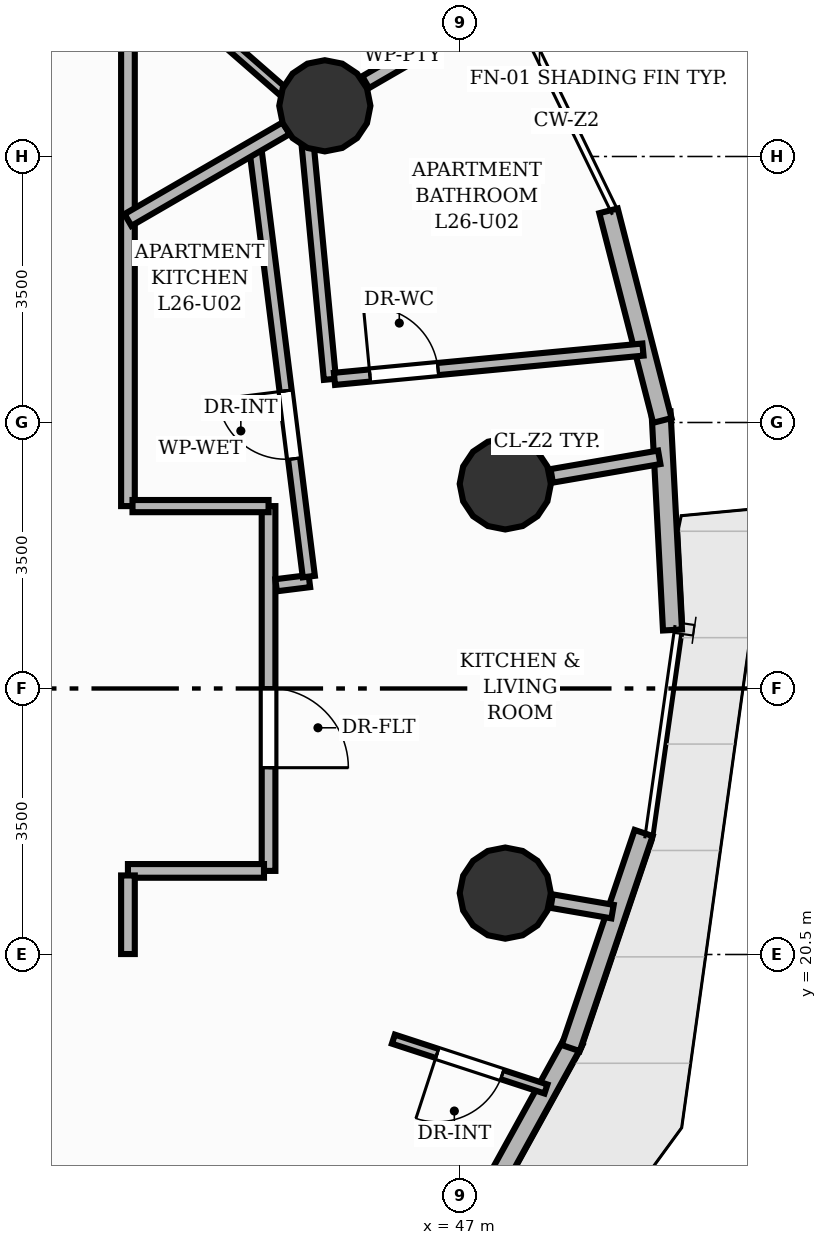
"""IFC4 building model, lengths in metres.
Left out: names, types, materials, properties, quantities, classifications, styles, units other than length and angle.
Written with IfcOpenShell. Run it as: python <this file> out.ifc"""

import sys

from ifc_helpers import new_model, si_unit, direction, frame, frame_2d, origin, origin_2d, place, context, subcontext, project, spatial, rectangle, circle, extrude, element, fill, save


model = new_model("IFC4")
c1 = context("Model", 3, precision=1e-05, world=origin(), true_north=direction((0.0, 1.0)))
c2 = subcontext(c1, "Body", "Model", "MODEL_VIEW")
j1 = project(units=[si_unit("LENGTHUNIT", "METRE"), si_unit("PLANEANGLEUNIT", "RADIAN")], contexts=[c1])
p1 = place(None, origin())
s1 = spatial("IfcSite", under=j1, at=p1, CompositionType="ELEMENT")
p2 = place(p1, origin())
s2 = spatial("IfcBuilding", under=s1, at=p2, CompositionType="ELEMENT")
p3 = place(p2, frame((0.0, 0.0, 90.08)))
s3 = spatial("IfcBuildingStorey", under=s2, at=p3, CompositionType="ELEMENT", Elevation=90.08)
for number, where, z_axis, x_axis in (
    (1, (47.594, 26.692, 0.0), (0.0, 0.0, 1.0), (1.0, 0.0, 0.0)),
    (2, (45.22, 31.667, 0.0), (0.0, 0.0, 1.0), (1.0, 0.0, 0.0)),
    (3, (47.594, 21.308, 0.0), (0.0, 0.0, 1.0), (1.0, 0.0, 0.0)),
):
    element("IfcColumn", number, at=place(p3, frame(where, z_axis=z_axis, x_axis=x_axis)), inside=s3, PredefinedType="COLUMN", context=c2, shape_type="SweptSolid", body=[
        extrude(circle(Radius=0.6, at=origin_2d()), origin(), (0.0, 0.0, 1.0), 3.2),
    ])
p4 = place(p3, frame((48.5, 19.371, 0.0), z_axis=(0.0, 0.0, 1.0), x_axis=(-0.482904421948, -0.875673066426, 0.0)))
e4 = element("IfcWall", 4, at=p4, inside=s3, PredefinedType="SOLIDWALL", context=c2, shape_type="SweptSolid", body=[
    extrude(rectangle(XDim=3.061, YDim=0.25, at=frame_2d((1.53, 0.0))), origin(), (0.0, 0.0, 1.0), 2.96),
])
p5 = place(p3, frame((49.415, 22.099, 0.0), z_axis=(0.0, 0.0, 1.0), x_axis=(-0.321149814784, -0.947028403198, 0.0)))
e5 = element("IfcWall", 5, at=p5, inside=s3, PredefinedType="SOLIDWALL", context=c2, shape_type="SweptSolid", body=[
    extrude(rectangle(XDim=2.988, YDim=0.25, at=frame_2d((1.494, 0.0))), origin(), (0.0, 0.0, 1.0), 2.96),
])
p6 = place(p3, frame((49.644, 27.64, 0.0), z_axis=(0.0, 0.0, 1.0), x_axis=(0.052411702269, -0.998625562193, 0.0)))
e6 = element("IfcWall", 6, at=p6, inside=s3, PredefinedType="SOLIDWALL", context=c2, shape_type="SweptSolid", body=[
    extrude(rectangle(XDim=2.874, YDim=0.25, at=frame_2d((1.437, 0.0))), origin(), (0.0, 0.0, 1.0), 2.96),
])
p7 = place(p3, frame((48.953, 30.285, 0.0), z_axis=(0.0, 0.0, 1.0), x_axis=(0.248825035787, -0.96854845081, 0.0)))
e7 = element("IfcWall", 7, at=p7, inside=s3, PredefinedType="SOLIDWALL", context=c2, shape_type="SweptSolid", body=[
    extrude(rectangle(XDim=2.847, YDim=0.25, at=frame_2d((1.424, 0.0))), origin(), (0.0, 0.0, 1.0), 2.96),
])
p8 = place(p3, frame((48.206, 26.798, 0.0), z_axis=(0.0, 0.0, 1.0), x_axis=(0.985402123708, 0.170242928172, 0.0)))
e8 = element("IfcWall", 8, at=p8, inside=s3, PredefinedType="PARTITIONING", context=c2, shape_type="SweptSolid", body=[
    extrude(rectangle(XDim=1.436, YDim=0.18, at=frame_2d((0.718, 0.0))), origin(), (0.0, 0.0, 1.0), 2.26),
])
p9 = place(p3, frame((45.757, 31.978, 0.0), z_axis=(0.0, 0.0, 1.0), x_axis=(0.865046065875, 0.501692439563, 0.0)))
e9 = element("IfcWall", 9, at=p9, inside=s3, PredefinedType="PARTITIONING", context=c2, shape_type="SweptSolid", body=[
    extrude(rectangle(XDim=1.994, YDim=0.18, at=frame_2d((0.997, 0.0))), origin(), (0.0, 0.0, 1.0), 2.26),
])
p10 = place(p3, frame((48.206, 21.202, 0.0), z_axis=(0.0, 0.0, 1.0), x_axis=(0.985418430365, -0.170148514822, 0.0)))
e10 = element("IfcWall", 10, at=p10, inside=s3, PredefinedType="PARTITIONING", context=c2, shape_type="SweptSolid", body=[
    extrude(rectangle(XDim=0.812, YDim=0.18, at=frame_2d((0.406, 0.0))), origin(), (0.0, 0.0, 1.0), 2.26),
])
p11 = place(p3, frame((44.48, 26.4, 0.0), z_axis=(0.0, 0.0, 1.0), x_axis=(0.0, -1.0, 0.0)))
e11 = element("IfcWall", 11, at=p11, inside=s3, PredefinedType="PARTITIONING", context=c2, shape_type="SweptSolid", body=[
    extrude(rectangle(XDim=4.8, YDim=0.18, at=frame_2d((2.4, 0.0))), origin(), (0.0, 0.0, 1.0), 2.955),
])
p12 = place(p11, frame((2.392, 0.0, 0.0)))
e12 = element("IfcOpeningElement", 12, at=p12, cuts=e11, PredefinedType="OPENING", context=c2, shape_type="SweptSolid", body=[
    extrude(rectangle(XDim=1.05, YDim=2.15, at=frame_2d((0.525, 1.075))), frame((0.0, 0.1, 0.0), z_axis=(0.0, -1.0, 0.0), x_axis=(1.0, 0.0, 0.0)), (0.0, 0.0, 1.0), 0.2),
])
p13 = place(p3, frame((44.42, 21.6, 0.0), z_axis=(0.0, 0.0, 1.0), x_axis=(-1.0, 0.0, 0.0)))
e13 = element("IfcWall", 13, at=p13, inside=s3, PredefinedType="PARTITIONING", context=c2, shape_type="SweptSolid", body=[
    extrude(rectangle(XDim=1.79, YDim=0.18, at=frame_2d((0.895, 0.0))), origin(), (0.0, 0.0, 1.0), 2.26),
])
p14 = place(p3, frame((42.63, 21.54, 0.0), z_axis=(0.0, 0.0, 1.0), x_axis=(0.0, -1.0, 0.0)))
e14 = element("IfcWall", 14, at=p14, inside=s3, PredefinedType="PARTITIONING", context=c2, shape_type="SweptSolid", body=[
    extrude(rectangle(XDim=1.034, YDim=0.18, at=frame_2d((0.517, 0.0))), origin(), (0.0, 0.0, 1.0), 2.955),
])
p15 = place(p3, frame((42.63, 32.63, 0.0), z_axis=(0.0, 0.0, 1.0), x_axis=(0.0, -1.0, 0.0)))
e15 = element("IfcWall", 15, at=p15, inside=s3, PredefinedType="PARTITIONING", context=c2, shape_type="SweptSolid", body=[
    extrude(rectangle(XDim=6.23, YDim=0.18, at=frame_2d((3.115, 0.0))), origin(), (0.0, 0.0, 1.0), 2.955),
])
p16 = place(p3, frame((42.69, 26.4, 0.0), z_axis=(0.0, 0.0, 1.0), x_axis=(1.0, 0.0, 0.0)))
e16 = element("IfcWall", 16, at=p16, inside=s3, PredefinedType="PLUMBINGWALL", context=c2, shape_type="SweptSolid", body=[
    extrude(rectangle(XDim=1.79, YDim=0.16, at=frame_2d((0.895, 0.0))), origin(), (0.0, 0.0, 1.0), 2.26),
])
p17 = place(p3, frame((44.997, 31.13, 0.0), z_axis=(0.0, 0.0, 1.0), x_axis=(0.094558062352, -0.995519348302, 0.0)))
e17 = element("IfcWall", 17, at=p17, inside=s3, PredefinedType="PLUMBINGWALL", context=c2, shape_type="SweptSolid", body=[
    extrude(rectangle(XDim=3.075, YDim=0.16, at=frame_2d((1.538, 0.0))), origin(), (0.0, 0.0, 1.0), 2.955),
])
p18 = place(p3, frame((45.347, 28.074, 0.0), z_axis=(0.0, 0.0, 1.0), x_axis=(0.995525564748, 0.09449259195, 0.0)))
e18 = element("IfcWall", 18, at=p18, inside=s3, PredefinedType="PLUMBINGWALL", context=c2, shape_type="SweptSolid", body=[
    extrude(rectangle(XDim=4.077, YDim=0.16, at=frame_2d((2.039, 0.0))), origin(), (0.0, 0.0, 1.0), 2.641),
])
p19 = place(p18, frame((0.469, 0.0, 0.0)))
e19 = element("IfcOpeningElement", 19, at=p19, cuts=e18, PredefinedType="OPENING", context=c2, shape_type="SweptSolid", body=[
    extrude(rectangle(XDim=0.9, YDim=2.1, at=frame_2d((0.45, 1.05))), frame((0.0, 0.09, 0.0), z_axis=(0.0, -1.0, 0.0), x_axis=(1.0, 0.0, 0.0)), (0.0, 0.0, 1.0), 0.18),
])
p20 = place(p3, frame((48.13, 18.73, 0.0), z_axis=(0.0, 0.0, 1.0), x_axis=(-0.950573429935, 0.310499845896, 0.0)))
e20 = element("IfcWall", 20, at=p20, inside=s3, PredefinedType="PARTITIONING", context=c2, shape_type="SweptSolid", body=[
    extrude(rectangle(XDim=2.112, YDim=0.125, at=frame_2d((1.056, 0.0))), origin(), (0.0, 0.0, 1.0), 2.955),
])
p21 = place(p20, frame((0.606, 0.0, 0.0)))
e21 = element("IfcOpeningElement", 21, at=p21, cuts=e20, PredefinedType="OPENING", context=c2, shape_type="SweptSolid", body=[
    extrude(rectangle(XDim=0.9, YDim=2.1, at=frame_2d((0.45, 1.05))), frame((0.0, 0.073, 0.0), z_axis=(0.0, -1.0, 0.0), x_axis=(1.0, 0.0, 0.0)), (0.0, 0.0, 1.0), 0.145),
])
p22 = place(p3, frame((44.579, 25.358, 0.0), z_axis=(0.0, 0.0, 1.0), x_axis=(0.992294886409, 0.123898581135, 0.0)))
e22 = element("IfcWall", 22, at=p22, inside=s3, PredefinedType="PLUMBINGWALL", context=c2, shape_type="SweptSolid", body=[
    extrude(rectangle(XDim=0.441, YDim=0.16, at=frame_2d((0.221, 0.0))), origin(), (0.0, 0.0, 1.0), 2.955),
])
p23 = place(p3, frame((45.01, 25.473, 0.0), z_axis=(0.0, 0.0, 1.0), x_axis=(-0.123955741663, 0.992287747636, 0.0)))
e23 = element("IfcWall", 23, at=p23, inside=s3, PredefinedType="PLUMBINGWALL", context=c2, shape_type="SweptSolid", body=[
    extrude(rectangle(XDim=5.706, YDim=0.16, at=frame_2d((2.853, 0.0))), origin(), (0.0, 0.0, 1.0), 2.955),
])
p24 = place(p23, frame((1.563, 0.0, 0.0)))
e24 = element("IfcOpeningElement", 24, at=p24, cuts=e23, PredefinedType="OPENING", context=c2, shape_type="SweptSolid", body=[
    extrude(rectangle(XDim=0.9, YDim=2.1, at=frame_2d((0.45, 1.05))), frame((0.0, 0.09, 0.0), z_axis=(0.0, -1.0, 0.0), x_axis=(1.0, 0.0, 0.0)), (0.0, 0.0, 1.0), 0.18),
])
p25 = place(p3, frame((42.63, 30.165, 0.0), z_axis=(0.0, 0.0, 1.0), x_axis=(0.86502326608, 0.501731750182, 0.0)))
e25 = element("IfcWall", 25, at=p25, inside=s3, PredefinedType="PARTITIONING", context=c2, shape_type="SweptSolid", body=[
    extrude(rectangle(XDim=2.407, YDim=0.18, at=frame_2d((1.204, 0.0))), origin(), (0.0, 0.0, 1.0), 2.26),
])
p26 = place(p3, frame((41.112, 34.96, 0.0), z_axis=(0.0, 0.0, 1.0), x_axis=(0.753425123405, -0.657533712765, 0.0)))
e26 = element("IfcWall", 26, at=p26, inside=s3, PredefinedType="PARTITIONING", context=c2, shape_type="SweptSolid", body=[
    extrude(rectangle(XDim=4.72, YDim=0.125, at=frame_2d((2.36, 0.0))), origin(), (0.0, 0.0, 1.0), 2.403),
])
p27 = place(p26, frame((1.49, 0.0, 0.0)))
e27 = element("IfcOpeningElement", 27, at=p27, cuts=e26, PredefinedType="OPENING", context=c2, shape_type="SweptSolid", body=[
    extrude(rectangle(XDim=0.9, YDim=2.1, at=frame_2d((0.45, 1.05))), frame((0.0, 0.073, 0.0), z_axis=(0.0, -1.0, 0.0), x_axis=(1.0, 0.0, 0.0)), (0.0, 0.0, 1.0), 0.145),
])
p28 = place(p12, origin())
e28 = element("IfcDoor", 28, at=p28, inside=s3, OperationType="SINGLE_SWING_RIGHT", PredefinedType="DOOR", context=c2, shape_type="SweptSolid", body=[
    extrude(rectangle(XDim=1.05, YDim=2.15, at=frame_2d((0.525, 1.075))), frame((0.0, 0.025, 0.0), z_axis=(0.0, -1.0, 0.0), x_axis=(1.0, 0.0, 0.0)), (0.0, 0.0, 1.0), 0.05),
])
fill(e12, e28)
p29 = place(p19, origin())
e29 = element("IfcDoor", 29, at=p29, inside=s3, OperationType="SINGLE_SWING_LEFT", PredefinedType="DOOR", context=c2, shape_type="SweptSolid", body=[
    extrude(rectangle(XDim=0.9, YDim=2.1, at=frame_2d((0.45, 1.05))), frame((0.0, 0.025, 0.0), z_axis=(0.0, -1.0, 0.0), x_axis=(1.0, 0.0, 0.0)), (0.0, 0.0, 1.0), 0.05),
])
fill(e19, e29)
p30 = place(p21, origin())
e30 = element("IfcDoor", 30, at=p30, inside=s3, OperationType="SINGLE_SWING_RIGHT", PredefinedType="DOOR", context=c2, shape_type="SweptSolid", body=[
    extrude(rectangle(XDim=0.9, YDim=2.1, at=frame_2d((0.45, 1.05))), frame((0.0, 0.025, 0.0), z_axis=(0.0, -1.0, 0.0), x_axis=(1.0, 0.0, 0.0)), (0.0, 0.0, 1.0), 0.05),
])
fill(e21, e30)
p31 = place(p24, origin())
e31 = element("IfcDoor", 31, at=p31, inside=s3, OperationType="SINGLE_SWING_RIGHT", PredefinedType="DOOR", context=c2, shape_type="SweptSolid", body=[
    extrude(rectangle(XDim=0.9, YDim=2.1, at=frame_2d((0.45, 1.05))), frame((0.0, 0.025, 0.0), z_axis=(0.0, -1.0, 0.0), x_axis=(1.0, 0.0, 0.0)), (0.0, 0.0, 1.0), 0.05),
])
fill(e24, e31)
save(model, sys.argv[1])
